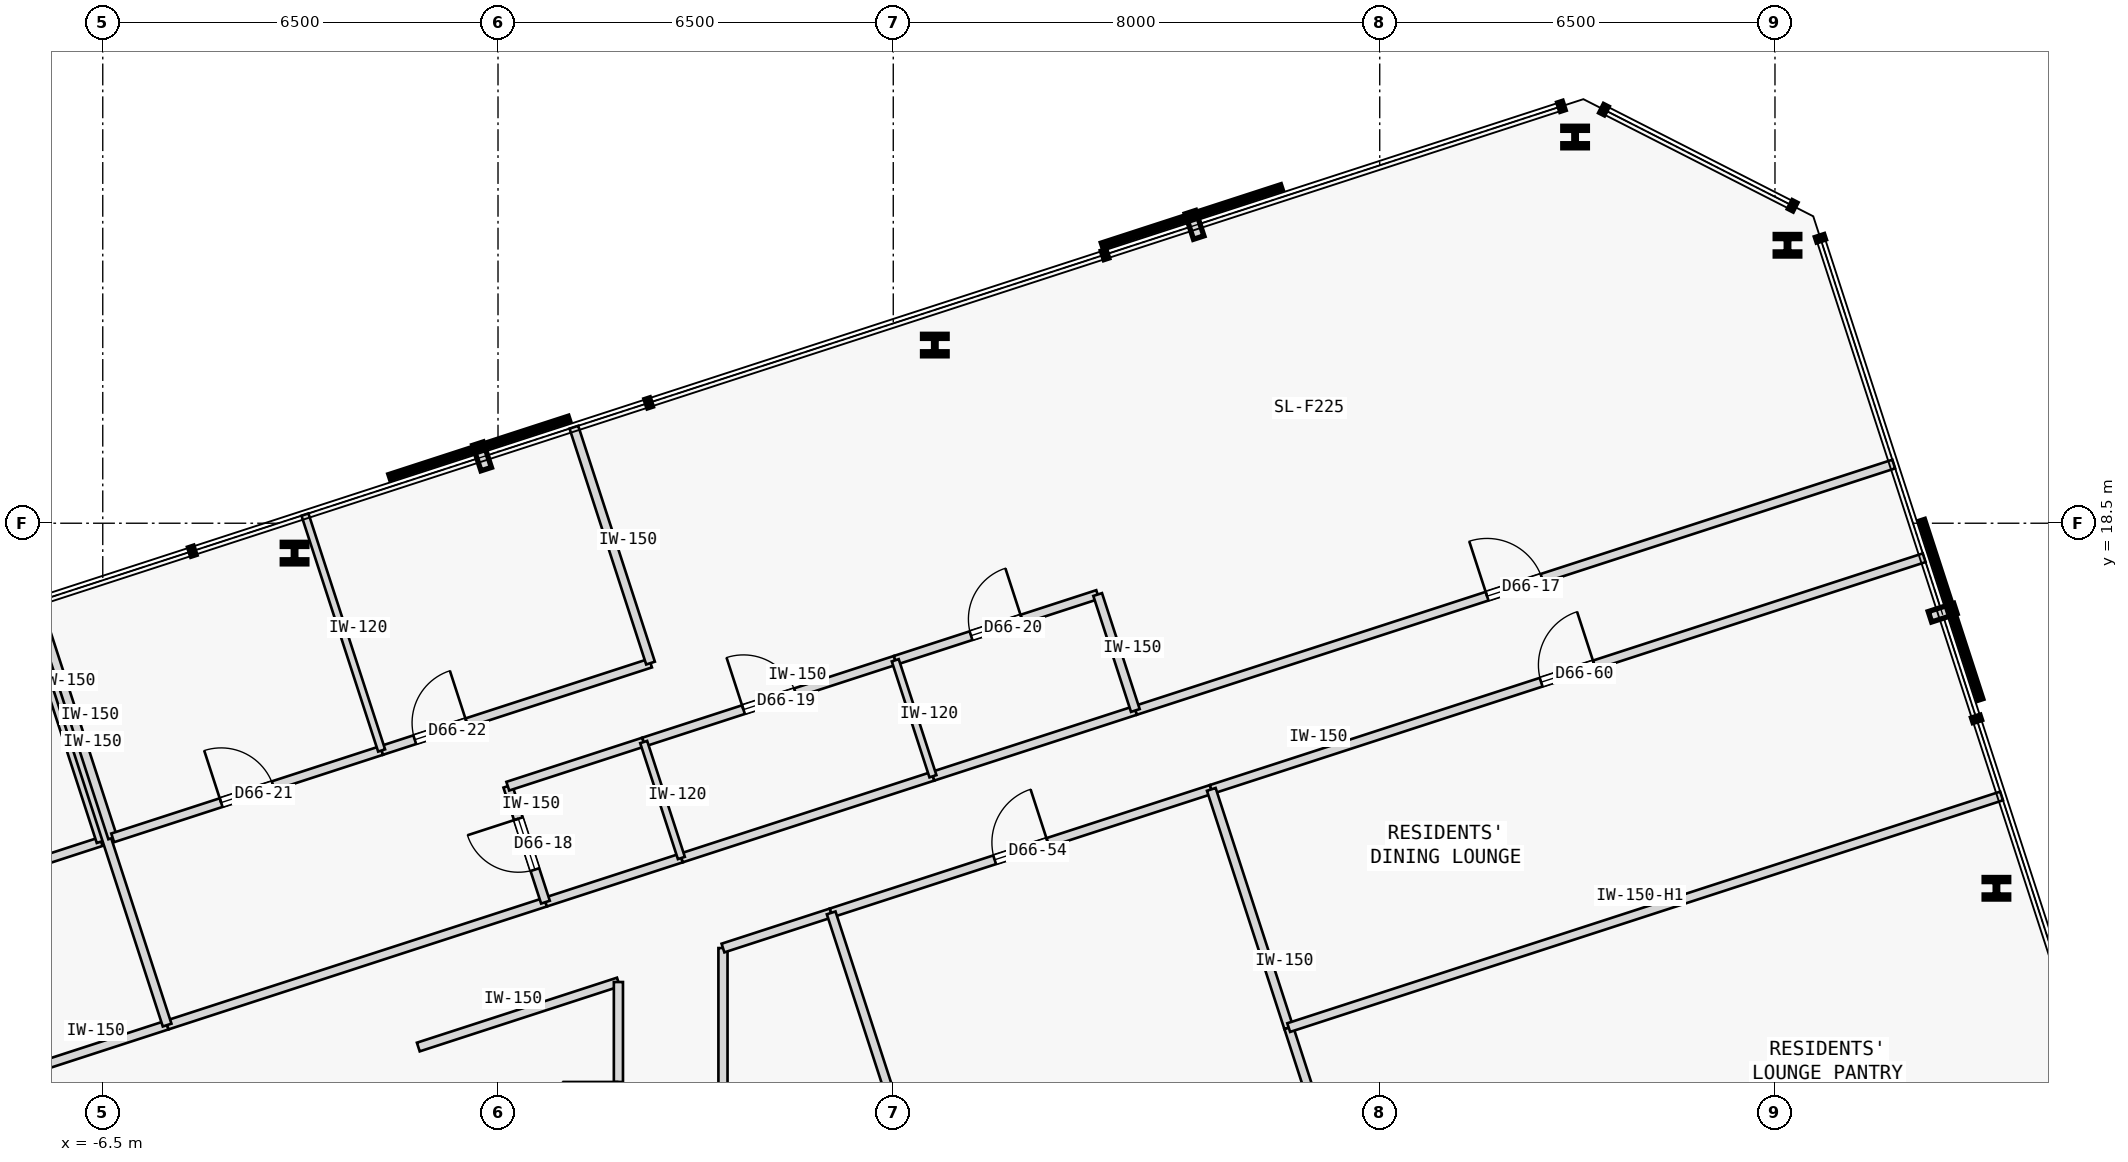
"""IFC4 building model, lengths in metres.
Left out: names, types, materials, properties, quantities, classifications, styles, units other than length and angle.
Written with IfcOpenShell. Run it as: python <this file> out.ifc"""

import sys

from ifc_helpers import new_model, si_unit, direction, frame, frame_2d, origin, origin_2d, place, context, subcontext, project, spatial, rectangle, i_section, extrude, element, fill, save


model = new_model("IFC4")
c1 = context("Model", 3, precision=1e-05, world=origin(), true_north=direction((0.0, 1.0)))
c2 = subcontext(c1, "Body", "Model", "MODEL_VIEW")
j1 = project(units=[si_unit("LENGTHUNIT", "METRE"), si_unit("PLANEANGLEUNIT", "RADIAN")], contexts=[c1])
p1 = place(None, origin())
s1 = spatial("IfcSite", under=j1, at=p1, CompositionType="ELEMENT")
p2 = place(p1, origin())
s2 = spatial("IfcBuilding", under=s1, at=p2, CompositionType="ELEMENT")
p3 = place(p2, frame((0.0, 0.0, 247.75)))
s3 = spatial("IfcBuildingStorey", under=s2, at=p3, CompositionType="ELEMENT", Elevation=247.75)
for number, where, z_axis, x_axis in (
    (1, (24.642, 12.497, 0.0), (0.0, 0.0, 1.0), (1.0, 0.0, 0.0)),
    (2, (21.206, 23.071, 0.0), (0.0, 0.0, 1.0), (1.0, 0.0, 0.0)),
    (3, (17.713, 24.851, 0.0), (0.0, 0.0, 1.0), (1.0, 0.0, 0.0)),
    (4, (7.184, 21.43, 0.0), (0.0, 0.0, 1.0), (1.0, 0.0, 0.0)),
    (5, (-3.346, 18.009, 0.0), (0.0, 0.0, 1.0), (1.0, 0.0, 0.0)),
):
    element("IfcColumn", number, at=place(p3, frame(where, z_axis=z_axis, x_axis=x_axis)), inside=s3, PredefinedType="COLUMN", context=c2, shape_type="SweptSolid", body=[
        extrude(i_section(OverallWidth=0.405, OverallDepth=0.355, WebThickness=0.042, FlangeThickness=0.068, FilletRadius=0.015, at=origin_2d()), origin(), (0.0, 0.0, 1.0), 3.35),
    ])
p4 = place(p3, frame((-19.497, 5.68, 0.0), z_axis=(0.0, 0.0, 1.0), x_axis=(0.95105300492, 0.309027801067, 0.0)))
e6 = element("IfcWall", 6, at=p4, inside=s3, PredefinedType="PARTITIONING", context=c2, shape_type="SweptSolid", body=[
    extrude(rectangle(XDim=14.779, YDim=0.15, at=frame_2d((7.39, 0.0))), origin(), (0.0, 0.0, 1.0), 3.125),
])
p5 = place(p4, frame((6.915, 0.0, 0.0)))
e7 = element("IfcOpeningElement", 7, at=p5, cuts=e6, PredefinedType="OPENING", context=c2, shape_type="SweptSolid", body=[
    extrude(rectangle(XDim=0.95, YDim=2.15, at=frame_2d((0.475, 1.075))), frame((0.0, 0.085, 0.0), z_axis=(0.0, -1.0, 0.0), x_axis=(1.0, 0.0, 0.0)), (0.0, 0.0, 1.0), 0.17),
])
p6 = place(p3, frame((-5.441, 10.247, 0.0), z_axis=(0.0, 0.0, 1.0), x_axis=(0.951062860421, 0.308997468483, 0.0)))
e8 = element("IfcWall", 8, at=p6, inside=s3, PredefinedType="PARTITIONING", context=c2, shape_type="SweptSolid", body=[
    extrude(rectangle(XDim=6.542, YDim=0.15, at=frame_2d((3.271, 0.0))), origin(), (0.0, 0.0, 1.0), 3.125),
])
p7 = place(p3, frame((10.481, 15.421, 0.0), z_axis=(0.0, 0.0, 1.0), x_axis=(0.951055682471, 0.30901956061, 0.0)))
e9 = element("IfcWall", 9, at=p7, inside=s3, PredefinedType="PARTITIONING", context=c2, shape_type="SweptSolid", body=[
    extrude(rectangle(XDim=13.114, YDim=0.15, at=frame_2d((6.557, 0.0))), origin(), (0.0, 0.0, 1.0), 3.125),
])
p8 = place(p7, frame((6.082, 0.0, 0.0)))
e10 = element("IfcOpeningElement", 10, at=p8, cuts=e9, PredefinedType="OPENING", context=c2, shape_type="SweptSolid", body=[
    extrude(rectangle(XDim=0.95, YDim=2.15, at=frame_2d((0.475, 1.075))), frame((0.0, 0.085, 0.0), z_axis=(0.0, -1.0, 0.0), x_axis=(1.0, 0.0, 0.0)), (0.0, 0.0, 1.0), 0.17),
])
p9 = place(p3, frame((0.781, 12.269, 0.0), z_axis=(0.0, 0.0, 1.0), x_axis=(0.951066131077, 0.308987401554, 0.0)))
e11 = element("IfcWall", 11, at=p9, inside=s3, PredefinedType="PARTITIONING", context=c2, shape_type="SweptSolid", body=[
    extrude(rectangle(XDim=2.35, YDim=0.15, at=frame_2d((1.175, 0.0))), origin(), (0.0, 0.0, 1.0), 3.125),
])
p10 = place(p3, frame((3.015, 12.995, 0.0), z_axis=(0.0, 0.0, 1.0), x_axis=(0.951052627573, 0.309028962374, 0.0)))
e12 = element("IfcWall", 12, at=p10, inside=s3, PredefinedType="PARTITIONING", context=c2, shape_type="SweptSolid", body=[
    extrude(rectangle(XDim=4.35, YDim=0.15, at=frame_2d((2.175, 0.0))), origin(), (0.0, 0.0, 1.0), 3.125),
])
p11 = place(p3, frame((7.152, 14.339, 0.0), z_axis=(0.0, 0.0, 1.0), x_axis=(0.951062257173, 0.308999325213, 0.0)))
e13 = element("IfcWall", 13, at=p11, inside=s3, PredefinedType="PARTITIONING", context=c2, shape_type="SweptSolid", body=[
    extrude(rectangle(XDim=3.5, YDim=0.15, at=frame_2d((1.75, 0.0))), origin(), (0.0, 0.0, 1.0), 3.125),
])
p12 = place(p3, frame((3.7, 5.6, 0.0), z_axis=(0.0, 0.0, 1.0), x_axis=(-0.000123839008, 0.999999992332, 0.0)))
e14 = element("IfcWall", 14, at=p12, inside=s3, PredefinedType="PARTITIONING", context=c2, shape_type="SweptSolid", body=[
    extrude(rectangle(XDim=5.914, YDim=0.15, at=frame_2d((2.957, 0.0))), origin(), (0.0, 0.0, 1.0), 2.675),
])
p13 = place(p12, frame((2.497, 0.0, 0.0)))
e15 = element("IfcOpeningElement", 15, at=p13, cuts=e14, PredefinedType="OPENING", context=c2, shape_type="SweptSolid", body=[
    extrude(rectangle(XDim=0.92, YDim=2.15, at=frame_2d((0.46, 1.075))), frame((0.0, 0.085, 0.0), z_axis=(0.0, -1.0, 0.0), x_axis=(1.0, 0.0, 0.0)), (0.0, 0.0, 1.0), 0.17),
])
p14 = place(p3, frame((3.699, 11.514, 0.0), z_axis=(0.0, 0.0, 1.0), x_axis=(0.951069540665, 0.308976906612, 0.0)))
e16 = element("IfcWall", 16, at=p14, inside=s3, PredefinedType="PARTITIONING", context=c2, shape_type="SweptSolid", body=[
    extrude(rectangle(XDim=1.871, YDim=0.15, at=frame_2d((0.936, 0.0))), origin(), (0.0, 0.0, 1.0), 3.125),
])
p15 = place(p3, frame((5.479, 12.092, 0.0), z_axis=(0.0, 0.0, 1.0), x_axis=(0.951051809397, 0.309031480343, 0.0)))
e17 = element("IfcWall", 17, at=p15, inside=s3, PredefinedType="PARTITIONING", context=c2, shape_type="SweptSolid", body=[
    extrude(rectangle(XDim=6.573, YDim=0.15, at=frame_2d((3.287, 0.0))), origin(), (0.0, 0.0, 1.0), 3.125),
])
p16 = place(p15, frame((2.826, 0.0, 0.0)))
e18 = element("IfcOpeningElement", 18, at=p16, cuts=e17, PredefinedType="OPENING", context=c2, shape_type="SweptSolid", body=[
    extrude(rectangle(XDim=0.92, YDim=2.15, at=frame_2d((0.46, 1.075))), frame((0.0, 0.085, 0.0), z_axis=(0.0, -1.0, 0.0), x_axis=(1.0, 0.0, 0.0)), (0.0, 0.0, 1.0), 0.17),
])
p17 = place(p3, frame((-1.311, 9.886, 0.0), z_axis=(0.0, 0.0, 1.0), x_axis=(0.951068803905, 0.308979174442, 0.0)))
e19 = element("IfcWall", 19, at=p17, inside=s3, PredefinedType="PARTITIONING", context=c2, shape_type="SweptSolid", body=[
    extrude(rectangle(XDim=3.46, YDim=0.15, at=frame_2d((1.73, 0.0))), origin(), (0.0, 0.0, 1.0), 3.125),
])
p18 = place(p3, frame((1.98, 6.748, 0.0), z_axis=(0.0, 0.0, 1.0), x_axis=(0.0, 1.0, 0.0)))
e20 = element("IfcWall", 20, at=p18, inside=s3, PredefinedType="PARTITIONING", context=c2, shape_type="SweptSolid", body=[
    extrude(rectangle(XDim=4.207, YDim=0.15, at=frame_2d((2.104, 0.0))), origin(), (0.0, 0.0, 1.0), 2.675),
])
p19 = place(p18, frame((1.643, 0.0, 0.0)))
e21 = element("IfcOpeningElement", 21, at=p19, cuts=e20, PredefinedType="OPENING", context=c2, shape_type="SweptSolid", body=[
    extrude(rectangle(XDim=0.92, YDim=2.15, at=frame_2d((0.46, 1.075))), frame((0.0, 0.085, 0.0), z_axis=(0.0, -1.0, 0.0), x_axis=(1.0, 0.0, 0.0)), (0.0, 0.0, 1.0), 0.17),
])
p20 = place(p3, frame((11.73, 14.123, 0.0), z_axis=(0.0, 0.0, 1.0), x_axis=(0.951060263663, 0.309005460926, 0.0)))
e22 = element("IfcWall", 22, at=p20, inside=s3, PredefinedType="PARTITIONING", context=c2, shape_type="SweptSolid", body=[
    extrude(rectangle(XDim=12.327, YDim=0.15, at=frame_2d((6.164, 0.0))), origin(), (0.0, 0.0, 1.0), 3.125),
])
p21 = place(p20, frame((5.704, 0.0, 0.0)))
e23 = element("IfcOpeningElement", 23, at=p21, cuts=e22, PredefinedType="OPENING", context=c2, shape_type="SweptSolid", body=[
    extrude(rectangle(XDim=0.92, YDim=2.15, at=frame_2d((0.46, 1.075))), frame((0.0, 0.085, 0.0), z_axis=(0.0, -1.0, 0.0), x_axis=(1.0, 0.0, 0.0)), (0.0, 0.0, 1.0), 0.17),
])
p22 = place(p3, frame((-10.949, 11.827, 0.0), z_axis=(0.0, 0.0, 1.0), x_axis=(0.951050272606, 0.309036209813, 0.0)))
e24 = element("IfcWall", 24, at=p22, inside=s3, PredefinedType="PARTITIONING", context=c2, shape_type="SweptSolid", body=[
    extrude(rectangle(XDim=4.65, YDim=0.15, at=frame_2d((2.325, 0.0))), origin(), (0.0, 0.0, 1.0), 3.125),
])
p23 = place(p22, frame((1.875, 0.0, 0.0)))
e25 = element("IfcOpeningElement", 25, at=p23, cuts=e24, PredefinedType="OPENING", context=c2, shape_type="SweptSolid", body=[
    extrude(rectangle(XDim=0.9, YDim=2.15, at=frame_2d((0.45, 1.075))), frame((0.0, 0.085, 0.0), z_axis=(0.0, -1.0, 0.0), x_axis=(1.0, 0.0, 0.0)), (0.0, 0.0, 1.0), 0.17),
])
p24 = place(p3, frame((-6.527, 13.264, 0.0), z_axis=(0.0, 0.0, 1.0), x_axis=(-0.308964264858, 0.951073647538, 0.0)))
e26 = element("IfcWall", 26, at=p24, inside=s3, PredefinedType="PARTITIONING", context=c2, shape_type="SweptSolid", body=[
    extrude(rectangle(XDim=4.079, YDim=0.15, at=frame_2d((2.04, 0.0))), origin(), (0.0, 0.0, 1.0), 3.125),
])
p25 = place(p3, frame((-5.441, 10.247, 0.0), z_axis=(0.0, 0.0, 1.0), x_axis=(-0.309039081864, 0.951049339351, 0.0)))
e27 = element("IfcWall", 27, at=p25, inside=s3, PredefinedType="PARTITIONING", context=c2, shape_type="SweptSolid", body=[
    extrude(rectangle(XDim=7.284, YDim=0.15, at=frame_2d((3.642, 0.0))), origin(), (0.0, 0.0, 1.0), 3.125),
])
p26 = place(p3, frame((0.781, 12.269, 0.0), z_axis=(0.0, 0.0, 1.0), x_axis=(-0.309058537449, 0.951043017129, 0.0)))
e28 = element("IfcWall", 28, at=p26, inside=s3, PredefinedType="PARTITIONING", context=c2, shape_type="SweptSolid", body=[
    extrude(rectangle(XDim=2.005, YDim=0.15, at=frame_2d((1.002, 0.0))), origin(), (0.0, 0.0, 1.0), 3.125),
])
p27 = place(p26, frame((0.562, 0.0, 0.0)))
e29 = element("IfcOpeningElement", 29, at=p27, cuts=e28, PredefinedType="OPENING", context=c2, shape_type="SweptSolid", body=[
    extrude(rectangle(XDim=0.88, YDim=2.15, at=frame_2d((0.44, 1.075))), frame((0.0, 0.085, 0.0), z_axis=(0.0, -1.0, 0.0), x_axis=(1.0, 0.0, 0.0)), (0.0, 0.0, 1.0), 0.17),
])
p28 = place(p3, frame((0.161, 14.176, 0.0), z_axis=(0.0, 0.0, 1.0), x_axis=(0.951035595692, 0.309081373955, 0.0)))
e30 = element("IfcWall", 30, at=p28, inside=s3, PredefinedType="PARTITIONING", context=c2, shape_type="SweptSolid", body=[
    extrude(rectangle(XDim=2.35, YDim=0.15, at=frame_2d((1.175, 0.0))), origin(), (0.0, 0.0, 1.0), 3.125),
])
p29 = place(p3, frame((2.396, 14.902, 0.0), z_axis=(0.0, 0.0, 1.0), x_axis=(0.951057987102, 0.309012467661, 0.0)))
e31 = element("IfcWall", 31, at=p29, inside=s3, PredefinedType="PARTITIONING", context=c2, shape_type="SweptSolid", body=[
    extrude(rectangle(XDim=4.35, YDim=0.15, at=frame_2d((2.175, 0.0))), origin(), (0.0, 0.0, 1.0), 3.125),
])
p30 = place(p29, frame((1.725, 0.0, 0.0)))
e32 = element("IfcOpeningElement", 32, at=p30, cuts=e31, PredefinedType="OPENING", context=c2, shape_type="SweptSolid", body=[
    extrude(rectangle(XDim=0.9, YDim=2.15, at=frame_2d((0.45, 1.075))), frame((0.0, 0.085, 0.0), z_axis=(0.0, -1.0, 0.0), x_axis=(1.0, 0.0, 0.0)), (0.0, 0.0, 1.0), 0.17),
])
p31 = place(p3, frame((6.533, 16.246, 0.0), z_axis=(0.0, 0.0, 1.0), x_axis=(0.951055596592, 0.309019824916, 0.0)))
e33 = element("IfcWall", 33, at=p31, inside=s3, PredefinedType="PARTITIONING", context=c2, shape_type="SweptSolid", body=[
    extrude(rectangle(XDim=3.5, YDim=0.15, at=frame_2d((1.75, 0.0))), origin(), (0.0, 0.0, 1.0), 3.125),
])
p32 = place(p31, frame((1.31, 0.0, 0.0)))
e34 = element("IfcOpeningElement", 34, at=p32, cuts=e33, PredefinedType="OPENING", context=c2, shape_type="SweptSolid", body=[
    extrude(rectangle(XDim=0.88, YDim=2.15, at=frame_2d((0.44, 1.075))), frame((0.0, 0.085, 0.0), z_axis=(0.0, -1.0, 0.0), x_axis=(1.0, 0.0, 0.0)), (0.0, 0.0, 1.0), 0.17),
])
p33 = place(p3, frame((10.481, 15.421, 0.0), z_axis=(0.0, 0.0, 1.0), x_axis=(-0.309022749039, 0.951054646472, 0.0)))
e35 = element("IfcWall", 35, at=p33, inside=s3, PredefinedType="PARTITIONING", context=c2, shape_type="SweptSolid", body=[
    extrude(rectangle(XDim=2.005, YDim=0.15, at=frame_2d((1.002, 0.0))), origin(), (0.0, 0.0, 1.0), 3.125),
])
p34 = place(p3, frame((-6.337, 13.326, 0.0), z_axis=(0.0, 0.0, 1.0), x_axis=(-0.309018403393, 0.951056058476, 0.0)))
e36 = element("IfcWall", 36, at=p34, inside=s3, PredefinedType="PARTITIONING", context=c2, shape_type="SweptSolid", body=[
    extrude(rectangle(XDim=4.079, YDim=0.15, at=frame_2d((2.04, 0.0))), origin(), (0.0, 0.0, 1.0), 3.125),
])
p35 = place(p3, frame((-6.337, 13.326, 0.0), z_axis=(0.0, 0.0, 1.0), x_axis=(0.951050272606, 0.309036209813, 0.0)))
e37 = element("IfcWall", 37, at=p35, inside=s3, PredefinedType="PARTITIONING", context=c2, shape_type="SweptSolid", body=[
    extrude(rectangle(XDim=4.65, YDim=0.15, at=frame_2d((2.325, 0.0))), origin(), (0.0, 0.0, 1.0), 3.125),
])
p36 = place(p35, frame((1.875, 0.0, 0.0)))
e38 = element("IfcOpeningElement", 38, at=p36, cuts=e37, PredefinedType="OPENING", context=c2, shape_type="SweptSolid", body=[
    extrude(rectangle(XDim=0.9, YDim=2.15, at=frame_2d((0.45, 1.075))), frame((0.0, 0.085, 0.0), z_axis=(0.0, -1.0, 0.0), x_axis=(1.0, 0.0, 0.0)), (0.0, 0.0, 1.0), 0.17),
])
p37 = place(p3, frame((-1.914, 14.763, 0.0), z_axis=(0.0, 0.0, 1.0), x_axis=(0.951065702951, 0.308988719326, 0.0)))
e39 = element("IfcWall", 39, at=p37, inside=s3, PredefinedType="PARTITIONING", context=c2, shape_type="SweptSolid", body=[
    extrude(rectangle(XDim=4.65, YDim=0.15, at=frame_2d((2.325, 0.0))), origin(), (0.0, 0.0, 1.0), 3.125),
])
p38 = place(p37, frame((0.573, 0.0, 0.0)))
e40 = element("IfcOpeningElement", 40, at=p38, cuts=e39, PredefinedType="OPENING", context=c2, shape_type="SweptSolid", body=[
    extrude(rectangle(XDim=0.9, YDim=2.15, at=frame_2d((0.45, 1.075))), frame((0.0, 0.085, 0.0), z_axis=(0.0, -1.0, 0.0), x_axis=(1.0, 0.0, 0.0)), (0.0, 0.0, 1.0), 0.17),
])
p39 = place(p3, frame((2.508, 16.2, 0.0), z_axis=(0.0, 0.0, 1.0), x_axis=(-0.309018403393, 0.951056058476, 0.0)))
e41 = element("IfcWall", 41, at=p39, inside=s3, PredefinedType="PARTITIONING", context=c2, shape_type="SweptSolid", body=[
    extrude(rectangle(XDim=4.079, YDim=0.15, at=frame_2d((2.04, 0.0))), origin(), (0.0, 0.0, 1.0), 3.125),
])
for number, where, z_axis, x_axis in (
    (42, (3.015, 12.995, 0.0), (0.0, 0.0, 1.0), (-0.309, 0.951, 0.0)),
    (43, (7.152, 14.339, 0.0), (0.0, 0.0, 1.0), (-0.309, 0.951, 0.0)),
):
    element("IfcWall", number, at=place(p3, frame(where, z_axis=z_axis, x_axis=x_axis)), inside=s3, PredefinedType="PARTITIONING", context=c2, shape_type="SweptSolid", body=[
        extrude(rectangle(XDim=2.005, YDim=0.12, at=frame_2d((1.002, 0.0))), origin(), (0.0, 0.0, 1.0), 3.125),
    ])
p40 = place(p3, frame((-1.914, 14.763, 0.0), z_axis=(0.0, 0.0, 1.0), x_axis=(-0.309018403393, 0.951056058476, 0.0)))
e44 = element("IfcWall", 44, at=p40, inside=s3, PredefinedType="PARTITIONING", context=c2, shape_type="SweptSolid", body=[
    extrude(rectangle(XDim=4.079, YDim=0.12, at=frame_2d((2.04, 0.0))), origin(), (0.0, 0.0, 1.0), 3.125),
])
p41 = place(p3, frame((7.588, 5.6, 0.0), z_axis=(0.0, 0.0, 1.0), x_axis=(-0.309018946982, 0.951055881852, 0.0)))
e45 = element("IfcWall", 45, at=p41, inside=s3, PredefinedType="PARTITIONING", context=c2, shape_type="SweptSolid", body=[
    extrude(rectangle(XDim=6.826, YDim=0.15, at=frame_2d((3.413, 0.0))), origin(), (0.0, 0.0, 1.0), 3.125),
])
p42 = place(p3, frame((14.5, 5.6, 0.0), z_axis=(0.0, 0.0, 1.0), x_axis=(-0.308974360462, 0.951070367837, 0.0)))
e46 = element("IfcWall", 46, at=p42, inside=s3, PredefinedType="PARTITIONING", context=c2, shape_type="SweptSolid", body=[
    extrude(rectangle(XDim=4.843, YDim=0.15, at=frame_2d((2.421, 0.0))), origin(), (0.0, 0.0, 1.0), 3.125),
])
p43 = place(p3, frame((13.003, 10.206, 0.0), z_axis=(0.0, 0.0, 1.0), x_axis=(-0.309035144366, 0.951050618814, 0.0)))
e47 = element("IfcWall", 47, at=p43, inside=s3, PredefinedType="PARTITIONING", context=c2, shape_type="SweptSolid", body=[
    extrude(rectangle(XDim=4.119, YDim=0.15, at=frame_2d((2.06, 0.0))), origin(), (0.0, 0.0, 1.0), 3.125),
])
p44 = place(p3, frame((13.003, 10.206, 0.0), z_axis=(0.0, 0.0, 1.0), x_axis=(0.951060263663, 0.309005460926, 0.0)))
e48 = element("IfcWall", 48, at=p44, inside=s3, PredefinedType="PARTITIONING", context=c2, shape_type="SweptSolid", body=[
    extrude(rectangle(XDim=12.327, YDim=0.15, at=frame_2d((6.164, 0.0))), origin(), (0.0, 0.0, 1.0), 2.675),
])
p45 = place(p8, origin())
e49 = element("IfcDoor", 49, at=p45, inside=s3, OperationType="SINGLE_SWING_LEFT", PredefinedType="DOOR", context=c2, shape_type="SweptSolid", body=[
    extrude(rectangle(XDim=0.95, YDim=2.15, at=frame_2d((0.475, 1.075))), frame((0.0, 0.025, 0.0), z_axis=(0.0, -1.0, 0.0), x_axis=(1.0, 0.0, 0.0)), (0.0, 0.0, 1.0), 0.05),
])
fill(e10, e49)
p46 = place(p27, origin())
e50 = element("IfcDoor", 50, at=p46, inside=s3, OperationType="SINGLE_SWING_RIGHT", PredefinedType="DOOR", context=c2, shape_type="SweptSolid", body=[
    extrude(rectangle(XDim=0.88, YDim=2.15, at=frame_2d((0.44, 1.075))), frame((0.0, 0.025, 0.0), z_axis=(0.0, -1.0, 0.0), x_axis=(1.0, 0.0, 0.0)), (0.0, 0.0, 1.0), 0.05),
])
fill(e29, e50)
p47 = place(p30, origin())
e51 = element("IfcDoor", 51, at=p47, inside=s3, OperationType="SINGLE_SWING_LEFT", PredefinedType="DOOR", context=c2, shape_type="SweptSolid", body=[
    extrude(rectangle(XDim=0.9, YDim=2.15, at=frame_2d((0.45, 1.075))), frame((0.0, 0.025, 0.0), z_axis=(0.0, -1.0, 0.0), x_axis=(1.0, 0.0, 0.0)), (0.0, 0.0, 1.0), 0.05),
])
fill(e32, e51)
p48 = place(p32, origin())
e52 = element("IfcDoor", 52, at=p48, inside=s3, OperationType="SINGLE_SWING_RIGHT", PredefinedType="DOOR", context=c2, shape_type="SweptSolid", body=[
    extrude(rectangle(XDim=0.88, YDim=2.15, at=frame_2d((0.44, 1.075))), frame((0.0, 0.025, 0.0), z_axis=(0.0, -1.0, 0.0), x_axis=(1.0, 0.0, 0.0)), (0.0, 0.0, 1.0), 0.05),
])
fill(e34, e52)
p49 = place(p36, origin())
e53 = element("IfcDoor", 53, at=p49, inside=s3, OperationType="SINGLE_SWING_LEFT", PredefinedType="DOOR", context=c2, shape_type="SweptSolid", body=[
    extrude(rectangle(XDim=0.9, YDim=2.15, at=frame_2d((0.45, 1.075))), frame((0.0, 0.025, 0.0), z_axis=(0.0, -1.0, 0.0), x_axis=(1.0, 0.0, 0.0)), (0.0, 0.0, 1.0), 0.05),
])
fill(e38, e53)
p50 = place(p38, origin())
e54 = element("IfcDoor", 54, at=p50, inside=s3, OperationType="SINGLE_SWING_RIGHT", PredefinedType="DOOR", context=c2, shape_type="SweptSolid", body=[
    extrude(rectangle(XDim=0.9, YDim=2.15, at=frame_2d((0.45, 1.075))), frame((0.0, 0.025, 0.0), z_axis=(0.0, -1.0, 0.0), x_axis=(1.0, 0.0, 0.0)), (0.0, 0.0, 1.0), 0.05),
])
fill(e40, e54)
p51 = place(p16, origin())
e55 = element("IfcDoor", 55, at=p51, inside=s3, OperationType="SINGLE_SWING_RIGHT", PredefinedType="DOOR", context=c2, shape_type="SweptSolid", body=[
    extrude(rectangle(XDim=0.92, YDim=2.15, at=frame_2d((0.46, 1.075))), frame((0.0, 0.025, 0.0), z_axis=(0.0, -1.0, 0.0), x_axis=(1.0, 0.0, 0.0)), (0.0, 0.0, 1.0), 0.05),
])
fill(e18, e55)
p52 = place(p21, origin())
e56 = element("IfcDoor", 56, at=p52, inside=s3, OperationType="SINGLE_SWING_RIGHT", PredefinedType="DOOR", context=c2, shape_type="SweptSolid", body=[
    extrude(rectangle(XDim=0.92, YDim=2.15, at=frame_2d((0.46, 1.075))), frame((0.0, 0.025, 0.0), z_axis=(0.0, -1.0, 0.0), x_axis=(1.0, 0.0, 0.0)), (0.0, 0.0, 1.0), 0.05),
])
fill(e23, e56)
save(model, sys.argv[1])
